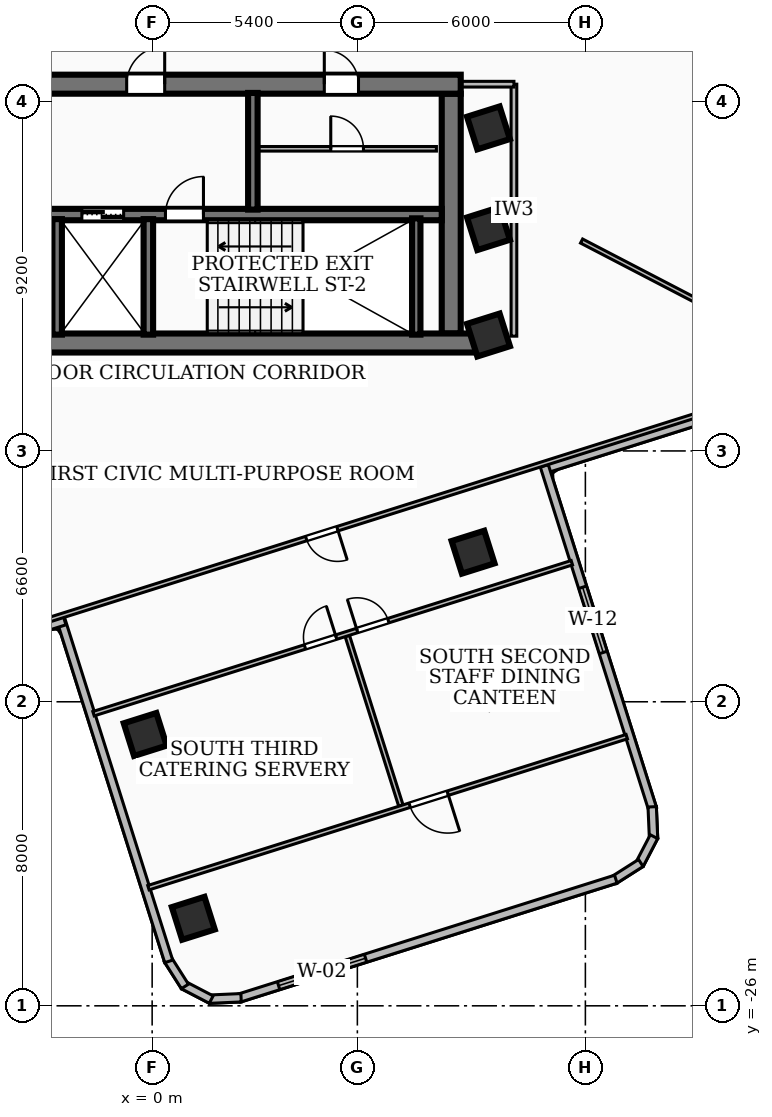
"""IFC4 building model, lengths in metres.
Left out: names, types, materials, properties, quantities, classifications, styles, units other than length and angle.
Written with IfcOpenShell. Run it as: python <this file> out.ifc"""

import sys

from ifc_helpers import new_model, si_unit, direction, frame, frame_2d, origin, origin_2d, place, context, subcontext, project, spatial, rectangle, extrude, element, fill, save


model = new_model("IFC4")
c1 = context("Model", 3, precision=1e-05, world=origin(), true_north=direction((0.0, 1.0)))
c2 = subcontext(c1, "Body", "Model", "MODEL_VIEW")
j1 = project(units=[si_unit("LENGTHUNIT", "METRE"), si_unit("PLANEANGLEUNIT", "RADIAN")], contexts=[c1])
p1 = place(None, origin())
s1 = spatial("IfcSite", under=j1, at=p1, CompositionType="ELEMENT")
p2 = place(p1, origin())
s2 = spatial("IfcBuilding", under=s1, at=p2, CompositionType="ELEMENT")
p3 = place(p2, frame((0.0, 0.0, 152.28)))
s3 = spatial("IfcBuildingStorey", under=s2, at=p3, CompositionType="ELEMENT", Elevation=152.28)
p4 = place(p3, frame((8.78, -8.56, 0.0), z_axis=(0.0, 0.0, 1.0), x_axis=(-1.0, 0.0, 0.0)))
e1 = element("IfcWall", 1, at=p4, inside=s3, PredefinedType="SHEAR", context=c2, shape_type="SweptSolid", body=[
    extrude(rectangle(XDim=17.56, YDim=0.5, at=frame_2d((8.78, 0.0))), origin(), (0.0, 0.0, 1.0), 3.34),
])
p5 = place(p3, frame((-8.12, -1.75, 0.0), z_axis=(0.0, 0.0, 1.0), x_axis=(1.0, 0.0, 0.0)))
e2 = element("IfcWall", 2, at=p5, inside=s3, PredefinedType="SHEAR", context=c2, shape_type="SweptSolid", body=[
    extrude(rectangle(XDim=16.24, YDim=0.5, at=frame_2d((8.12, 0.0))), origin(), (0.0, 0.0, 1.0), 3.34),
])
p6 = place(p5, frame((7.45, 0.0, 0.0)))
e3 = element("IfcOpeningElement", 3, at=p6, cuts=e2, PredefinedType="OPENING", context=c2, shape_type="SweptSolid", body=[
    extrude(rectangle(XDim=1.0, YDim=2.1, at=frame_2d((0.5, 1.05))), frame((0.0, 0.26, 0.0), z_axis=(0.0, -1.0, 0.0), x_axis=(1.0, 0.0, 0.0)), (0.0, 0.0, 1.0), 0.52),
])
p7 = place(p5, frame((12.65, 0.0, 0.0)))
e4 = element("IfcOpeningElement", 4, at=p7, cuts=e2, PredefinedType="OPENING", context=c2, shape_type="SweptSolid", body=[
    extrude(rectangle(XDim=0.9, YDim=2.06, at=frame_2d((0.45, 1.03))), frame((0.0, 0.26, 0.0), z_axis=(0.0, -1.0, 0.0), x_axis=(1.0, 0.0, 0.0)), (0.0, 0.0, 1.0), 0.52),
])
p8 = place(p5, frame((0.565, 0.0, 0.0)))
e5 = element("IfcOpeningElement", 5, at=p8, cuts=e2, PredefinedType="OPENING", context=c2, shape_type="SweptSolid", body=[
    extrude(rectangle(XDim=1.05, YDim=2.15, at=frame_2d((0.525, 1.075))), frame((0.0, 0.26, 0.0), z_axis=(0.0, -1.0, 0.0), x_axis=(1.0, 0.0, 0.0)), (0.0, 0.0, 1.0), 0.52),
])
p9 = place(p5, frame((2.125, 0.0, 0.0)))
e6 = element("IfcOpeningElement", 6, at=p9, cuts=e2, PredefinedType="OPENING", context=c2, shape_type="SweptSolid", body=[
    extrude(rectangle(XDim=1.05, YDim=2.15, at=frame_2d((0.525, 1.075))), frame((0.0, 0.26, 0.0), z_axis=(0.0, -1.0, 0.0), x_axis=(1.0, 0.0, 0.0)), (0.0, 0.0, 1.0), 0.52),
])
p10 = place(p5, frame((3.685, 0.0, 0.0)))
e7 = element("IfcOpeningElement", 7, at=p10, cuts=e2, PredefinedType="OPENING", context=c2, shape_type="SweptSolid", body=[
    extrude(rectangle(XDim=1.05, YDim=2.15, at=frame_2d((0.525, 1.075))), frame((0.0, 0.26, 0.0), z_axis=(0.0, -1.0, 0.0), x_axis=(1.0, 0.0, 0.0)), (0.0, 0.0, 1.0), 0.52),
])
p11 = place(p3, frame((7.87, -2.0, 0.0), z_axis=(0.0, 0.0, 1.0), x_axis=(0.0, -1.0, 0.0)))
e8 = element("IfcWall", 8, at=p11, inside=s3, PredefinedType="SHEAR", context=c2, shape_type="SweptSolid", body=[
    extrude(rectangle(XDim=6.31, YDim=0.5, at=frame_2d((3.155, 0.0))), origin(), (0.0, 0.0, 1.0), 3.34),
])
p12 = place(p3, frame((-7.62, -5.18, 0.0), z_axis=(0.0, 0.0, 1.0), x_axis=(1.0, 0.0, 0.0)))
e9 = element("IfcWall", 9, at=p12, inside=s3, PredefinedType="SOLIDWALL", context=c2, shape_type="SweptSolid", body=[
    extrude(rectangle(XDim=15.24, YDim=0.3, at=frame_2d((7.62, 0.0))), origin(), (0.0, 0.0, 1.0), 3.34),
])
p13 = place(p12, frame((5.77, 0.0, 0.0)))
e10 = element("IfcOpeningElement", 10, at=p13, cuts=e9, PredefinedType="OPENING", context=c2, shape_type="SweptSolid", body=[
    extrude(rectangle(XDim=1.1, YDim=2.15, at=frame_2d((0.55, 1.075))), frame((0.0, 0.16, 0.0), z_axis=(0.0, -1.0, 0.0), x_axis=(1.0, 0.0, 0.0)), (0.0, 0.0, 1.0), 0.32),
])
p14 = place(p12, frame((7.97, 0.0, 0.0)))
e11 = element("IfcOpeningElement", 11, at=p14, cuts=e9, PredefinedType="OPENING", context=c2, shape_type="SweptSolid", body=[
    extrude(rectangle(XDim=1.0, YDim=2.1, at=frame_2d((0.5, 1.05))), frame((0.0, 0.16, 0.0), z_axis=(0.0, -1.0, 0.0), x_axis=(1.0, 0.0, 0.0)), (0.0, 0.0, 1.0), 0.32),
])
p15 = place(p3, frame((6.95, -8.34, 0.0), z_axis=(0.0, 0.0, 1.0), x_axis=(0.0, 1.0, 0.0)))
e12 = element("IfcWall", 12, at=p15, inside=s3, PredefinedType="SOLIDWALL", context=c2, shape_type="SweptSolid", body=[
    extrude(rectangle(XDim=3.06, YDim=0.22, at=frame_2d((1.53, 0.0))), origin(), (0.0, 0.0, 1.0), 3.34),
])
for number, where, z_axis, x_axis in (
    (13, (-0.1, -8.34, 0.0), (0.0, 0.0, 1.0), (0.0, 1.0, 0.0)),
    (14, (-2.5, -8.34, 0.0), (0.0, 0.0, 1.0), (0.0, 1.0, 0.0)),
):
    element("IfcWall", number, at=place(p3, frame(where, z_axis=z_axis, x_axis=x_axis)), inside=s3, PredefinedType="SOLIDWALL", context=c2, shape_type="SweptSolid", body=[
        extrude(rectangle(XDim=3.04, YDim=0.25, at=frame_2d((1.52, 0.0))), origin(), (0.0, 0.0, 1.0), 3.34),
    ])
p16 = place(p3, frame((2.65, -5.05, 0.0), z_axis=(0.0, 0.0, 1.0), x_axis=(0.0, 1.0, 0.0)))
e15 = element("IfcWall", 15, at=p16, inside=s3, PredefinedType="SOLIDWALL", context=c2, shape_type="SweptSolid", body=[
    extrude(rectangle(XDim=3.07, YDim=0.25, at=frame_2d((1.535, 0.0))), origin(), (0.0, 0.0, 1.0), 3.34),
])
for number, where, z_axis, x_axis in (
    (16, (8.85, -5.55, 0.0), (0.0, 0.0, 1.0), (0.954, 0.301, 0.0)),
    (17, (8.85, -2.9, 0.0), (0.0, 0.0, 1.0), (0.954, 0.301, 0.0)),
    (18, (8.85, -8.35, 0.0), (0.0, 0.0, 1.0), (0.954, 0.301, 0.0)),
    (19, (-0.183, -18.86, 0.0), (0.0, 0.0, 1.0), (0.954, 0.301, 0.0)),
    (20, (8.445, -14.064, 0.0), (0.0, 0.0, 1.0), (0.954, 0.301, 0.0)),
    (21, (1.083, -23.697, 0.0), (0.0, 0.0, 1.0), (0.954, 0.301, 0.0)),
    (22, (9.208, -17.615, 0.0), (0.0, 0.0, 1.0), (0.954, 0.301, 0.0)),
):
    element("IfcColumn", number, at=place(p3, frame(where, z_axis=z_axis, x_axis=x_axis)), inside=s3, PredefinedType="COLUMN", context=c2, shape_type="SweptSolid", body=[
        extrude(rectangle(XDim=0.9, YDim=0.9, at=origin_2d()), origin(), (0.0, 0.0, 1.0), 3.6),
    ])
p17 = place(p3, frame((16.706, -9.868, 0.0), z_axis=(0.0, 0.0, 1.0), x_axis=(-0.953629605256, -0.300982683852, 0.0)))
e23 = element("IfcWall", 23, at=p17, inside=s3, PredefinedType="SOLIDWALL", context=c2, shape_type="SweptSolid", body=[
    extrude(rectangle(XDim=6.759, YDim=0.22, at=frame_2d((3.379, 0.0))), origin(), (0.0, 0.0, 1.0), 3.34),
])
p18 = place(p3, frame((10.319, -11.792, 0.0), z_axis=(0.0, 0.0, 1.0), x_axis=(0.301051082334, -0.953608014766, 0.0)))
e24 = element("IfcWall", 24, at=p18, inside=s3, PredefinedType="SOLIDWALL", context=c2, shape_type="SweptSolid", body=[
    extrude(rectangle(XDim=9.46, YDim=0.22, at=frame_2d((4.73, 0.0))), origin(), (0.0, 0.0, 1.0), 3.34),
])
p19 = place(p18, frame((3.35, 0.0, 0.85)))
e25 = element("IfcOpeningElement", 25, at=p19, cuts=e24, PredefinedType="OPENING", context=c2, shape_type="SweptSolid", body=[
    extrude(rectangle(XDim=1.8, YDim=1.6, at=frame_2d((0.9, 0.8))), frame((0.0, 0.12, 0.0), z_axis=(0.0, -1.0, 0.0), x_axis=(1.0, 0.0, 0.0)), (0.0, 0.0, 1.0), 0.24),
])
p20 = place(p3, frame((13.158, -20.764, 0.0), z_axis=(0.0, 0.0, 1.0), x_axis=(0.043335569986, -0.999060572925, 0.0)))
e26 = element("IfcWall", 26, at=p20, inside=s3, PredefinedType="SOLIDWALL", context=c2, shape_type="SweptSolid", body=[
    extrude(rectangle(XDim=0.834, YDim=0.22, at=frame_2d((0.417, 0.0))), origin(), (0.0, 0.0, 1.0), 3.34),
])
p21 = place(p3, frame((13.205, -21.55, 0.0), z_axis=(0.0, 0.0, 1.0), x_axis=(-0.462393015656, -0.886675080891, 0.0)))
e27 = element("IfcWall", 27, at=p21, inside=s3, PredefinedType="SOLIDWALL", context=c2, shape_type="SweptSolid", body=[
    extrude(rectangle(XDim=0.82, YDim=0.22, at=frame_2d((0.41, 0.0))), origin(), (0.0, 0.0, 1.0), 3.34),
])
p22 = place(p3, frame((12.859, -22.242, 0.0), z_axis=(0.0, 0.0, 1.0), x_axis=(-0.843806278008, -0.536647896851, 0.0)))
e28 = element("IfcWall", 28, at=p22, inside=s3, PredefinedType="SOLIDWALL", context=c2, shape_type="SweptSolid", body=[
    extrude(rectangle(XDim=0.833, YDim=0.22, at=frame_2d((0.417, 0.0))), origin(), (0.0, 0.0, 1.0), 3.34),
])
p23 = place(p3, frame((12.201, -22.668, 0.0), z_axis=(0.0, 0.0, 1.0), x_axis=(-0.953590831, -0.30110550814, 0.0)))
e29 = element("IfcWall", 29, at=p23, inside=s3, PredefinedType="SOLIDWALL", context=c2, shape_type="SweptSolid", body=[
    extrude(rectangle(XDim=10.392, YDim=0.22, at=frame_2d((5.196, 0.0))), origin(), (0.0, 0.0, 1.0), 3.34),
])
p24 = place(p23, frame((6.906, 0.0, 0.85)))
e30 = element("IfcOpeningElement", 30, at=p24, cuts=e29, PredefinedType="OPENING", context=c2, shape_type="SweptSolid", body=[
    extrude(rectangle(XDim=2.4, YDim=2.1, at=frame_2d((1.2, 1.05))), frame((0.0, 0.12, 0.0), z_axis=(0.0, -1.0, 0.0), x_axis=(1.0, 0.0, 0.0)), (0.0, 0.0, 1.0), 0.24),
])
p25 = place(p3, frame((2.34, -25.788, 0.0), z_axis=(0.0, 0.0, 1.0), x_axis=(-0.999022158458, -0.044212293648, 0.0)))
e31 = element("IfcWall", 31, at=p25, inside=s3, PredefinedType="SOLIDWALL", context=c2, shape_type="SweptSolid", body=[
    extrude(rectangle(XDim=0.834, YDim=0.22, at=frame_2d((0.417, 0.0))), origin(), (0.0, 0.0, 1.0), 3.34),
])
p26 = place(p3, frame((1.554, -25.836, 0.0), z_axis=(0.0, 0.0, 1.0), x_axis=(-0.886797138652, 0.462158884885, 0.0)))
e32 = element("IfcWall", 32, at=p26, inside=s3, PredefinedType="SOLIDWALL", context=c2, shape_type="SweptSolid", body=[
    extrude(rectangle(XDim=0.82, YDim=0.22, at=frame_2d((0.41, 0.0))), origin(), (0.0, 0.0, 1.0), 3.34),
])
p27 = place(p3, frame((0.862, -25.49, 0.0), z_axis=(0.0, 0.0, 1.0), x_axis=(-0.535984955812, 0.844227532803, 0.0)))
e33 = element("IfcWall", 33, at=p27, inside=s3, PredefinedType="SOLIDWALL", context=c2, shape_type="SweptSolid", body=[
    extrude(rectangle(XDim=0.834, YDim=0.22, at=frame_2d((0.417, 0.0))), origin(), (0.0, 0.0, 1.0), 3.34),
])
p28 = place(p3, frame((0.436, -24.831, 0.0), z_axis=(0.0, 0.0, 1.0), x_axis=(-0.301016470916, 0.953618940792, 0.0)))
e34 = element("IfcWall", 34, at=p28, inside=s3, PredefinedType="SOLIDWALL", context=c2, shape_type="SweptSolid", body=[
    extrude(rectangle(XDim=9.458, YDim=0.22, at=frame_2d((4.729, 0.0))), origin(), (0.0, 0.0, 1.0), 2.152),
])
p29 = place(p3, frame((-2.301, -15.87, 0.0), z_axis=(0.0, 0.0, 1.0), x_axis=(-0.953652264112, -0.300910882413, 0.0)))
e35 = element("IfcWall", 35, at=p29, inside=s3, PredefinedType="SOLIDWALL", context=c2, shape_type="SweptSolid", body=[
    extrude(rectangle(XDim=5.989, YDim=0.22, at=frame_2d((2.994, 0.0))), origin(), (0.0, 0.0, 1.0), 2.152),
])
p30 = place(p3, frame((2.8, -3.45, 0.0), z_axis=(0.0, 0.0, 1.0), x_axis=(1.0, 0.0, 0.0)))
e36 = element("IfcWall", 36, at=p30, inside=s3, PredefinedType="PARTITIONING", context=c2, shape_type="SweptSolid", body=[
    extrude(rectangle(XDim=4.68, YDim=0.12, at=frame_2d((2.34, 0.0))), origin(), (0.0, 0.0, 1.0), 3.34),
])
p31 = place(p30, frame((1.9, 0.0, 0.0)))
e37 = element("IfcOpeningElement", 37, at=p31, cuts=e36, PredefinedType="OPENING", context=c2, shape_type="SweptSolid", body=[
    extrude(rectangle(XDim=0.86, YDim=2.04, at=frame_2d((0.43, 1.02))), frame((0.0, 0.07, 0.0), z_axis=(0.0, -1.0, 0.0), x_axis=(1.0, 0.0, 0.0)), (0.0, 0.0, 1.0), 0.14),
])
p32 = place(p3, frame((9.52, -8.38, 0.0), z_axis=(0.0, 0.0, 1.0), x_axis=(0.0, 1.0, 0.0)))
e38 = element("IfcWall", 38, at=p32, inside=s3, PredefinedType="PARTITIONING", context=c2, shape_type="SweptSolid", body=[
    extrude(rectangle(XDim=6.63, YDim=0.15, at=frame_2d((3.315, 0.0))), origin(), (0.0, 0.0, 1.0), 2.152),
])
p33 = place(p3, frame((7.85, -1.75, 0.0), z_axis=(0.0, 0.0, 1.0), x_axis=(1.0, 0.0, 0.0)))
e39 = element("IfcWall", 39, at=p33, inside=s3, PredefinedType="PARTITIONING", context=c2, shape_type="SweptSolid", body=[
    extrude(rectangle(XDim=1.67, YDim=0.15, at=frame_2d((0.835, 0.0))), origin(), (0.0, 0.0, 1.0), 2.57),
])
p34 = place(p3, frame((11.3, -5.877, 0.0), z_axis=(0.0, 0.0, 1.0), x_axis=(0.887198362964, -0.461388193123, 0.0)))
e40 = element("IfcWall", 40, at=p34, inside=s3, PredefinedType="PARTITIONING", context=c2, shape_type="SweptSolid", body=[
    extrude(rectangle(XDim=6.938, YDim=0.12, at=frame_2d((3.469, 0.0))), origin(), (0.0, 0.0, 1.0), 3.34),
])
p35 = place(p3, frame((10.379, 14.591, 0.0), z_axis=(0.0, 0.0, 1.0), x_axis=(0.301070726534, -0.95360181293, 0.0)))
e41 = element("IfcWall", 41, at=p35, inside=s3, PredefinedType="PARTITIONING", context=c2, shape_type="SweptSolid", body=[
    extrude(rectangle(XDim=20.81, YDim=0.12, at=frame_2d((10.405, 0.0))), origin(), (0.0, 0.0, 1.0), 2.152),
])
p36 = place(p35, frame((10.189, 0.0, 0.0)))
e42 = element("IfcOpeningElement", 42, at=p36, cuts=e41, PredefinedType="OPENING", context=c2, shape_type="SweptSolid", body=[
    extrude(rectangle(XDim=0.86, YDim=2.0, at=frame_2d((0.43, 1.0))), frame((0.0, 0.07, 0.0), z_axis=(0.0, -1.0, 0.0), x_axis=(1.0, 0.0, 0.0)), (0.0, 0.0, 1.0), 0.14),
])
p37 = place(p3, frame((14.591, -10.379, 0.0), z_axis=(0.0, 0.0, 1.0), x_axis=(-0.95360181293, -0.301070726534, 0.0)))
e43 = element("IfcWall", 43, at=p37, inside=s3, PredefinedType="PARTITIONING", context=c2, shape_type="SweptSolid", body=[
    extrude(rectangle(XDim=20.81, YDim=0.12, at=frame_2d((10.405, 0.0))), origin(), (0.0, 0.0, 1.0), 2.152),
])
p38 = place(p37, frame((10.189, 0.0, 0.0)))
e44 = element("IfcOpeningElement", 44, at=p38, cuts=e43, PredefinedType="OPENING", context=c2, shape_type="SweptSolid", body=[
    extrude(rectangle(XDim=0.86, YDim=2.0, at=frame_2d((0.43, 1.0))), frame((0.0, 0.07, 0.0), z_axis=(0.0, -1.0, 0.0), x_axis=(1.0, 0.0, 0.0)), (0.0, 0.0, 1.0), 0.14),
])
p39 = place(p3, frame((5.136, -16.269, 0.0), z_axis=(0.0, 0.0, 1.0), x_axis=(0.301053971024, -0.953607102811, 0.0)))
e45 = element("IfcWall", 45, at=p39, inside=s3, PredefinedType="PARTITIONING", context=c2, shape_type="SweptSolid", body=[
    extrude(rectangle(XDim=4.68, YDim=0.12, at=frame_2d((2.34, 0.0))), origin(), (0.0, 0.0, 1.0), 2.152),
])
p40 = place(p3, frame((-1.543, -18.314, 0.0), z_axis=(0.0, 0.0, 1.0), x_axis=(0.953624308899, 0.300999464247, 0.0)))
e46 = element("IfcWall", 46, at=p40, inside=s3, PredefinedType="PARTITIONING", context=c2, shape_type="SweptSolid", body=[
    extrude(rectangle(XDim=13.199, YDim=0.12, at=frame_2d((6.6, 0.0))), origin(), (0.0, 0.0, 1.0), 2.152),
])
p41 = place(p40, frame((5.835, 0.0, 0.0)))
e47 = element("IfcOpeningElement", 47, at=p41, cuts=e46, PredefinedType="OPENING", context=c2, shape_type="SweptSolid", body=[
    extrude(rectangle(XDim=0.86, YDim=2.04, at=frame_2d((0.43, 1.02))), frame((0.0, 0.07, 0.0), z_axis=(0.0, -1.0, 0.0), x_axis=(1.0, 0.0, 0.0)), (0.0, 0.0, 1.0), 0.14),
])
p42 = place(p40, frame((7.275, 0.0, 0.0)))
e48 = element("IfcOpeningElement", 48, at=p42, cuts=e46, PredefinedType="OPENING", context=c2, shape_type="SweptSolid", body=[
    extrude(rectangle(XDim=0.86, YDim=2.04, at=frame_2d((0.43, 1.02))), frame((0.0, 0.07, 0.0), z_axis=(0.0, -1.0, 0.0), x_axis=(1.0, 0.0, 0.0)), (0.0, 0.0, 1.0), 0.14),
])
p43 = place(p3, frame((12.489, -18.918, 0.0), z_axis=(0.0, 0.0, 1.0), x_axis=(-0.953597759193, -0.301083565912, 0.0)))
e49 = element("IfcWall", 49, at=p43, inside=s3, PredefinedType="PARTITIONING", context=c2, shape_type="SweptSolid", body=[
    extrude(rectangle(XDim=13.199, YDim=0.12, at=frame_2d((6.6, 0.0))), origin(), (0.0, 0.0, 1.0), 2.152),
])
p44 = place(p43, frame((4.94, 0.0, 0.0)))
e50 = element("IfcOpeningElement", 50, at=p44, cuts=e49, PredefinedType="OPENING", context=c2, shape_type="SweptSolid", body=[
    extrude(rectangle(XDim=1.05, YDim=2.08, at=frame_2d((0.525, 1.04))), frame((0.0, 0.07, 0.0), z_axis=(0.0, -1.0, 0.0), x_axis=(1.0, 0.0, 0.0)), (0.0, 0.0, 1.0), 0.14),
])
p45 = place(p19, origin())
e51 = element("IfcWindow", 51, at=p45, inside=s3, PartitioningType="SINGLE_PANEL", PredefinedType="WINDOW", context=c2, shape_type="SweptSolid", body=[
    extrude(rectangle(XDim=1.8, YDim=1.6, at=frame_2d((0.9, 0.8))), frame((0.0, 0.03, 0.0), z_axis=(0.0, -1.0, 0.0), x_axis=(1.0, 0.0, 0.0)), (0.0, 0.0, 1.0), 0.06),
])
fill(e25, e51)
p46 = place(p24, origin())
e52 = element("IfcWindow", 52, at=p46, inside=s3, PartitioningType="SINGLE_PANEL", PredefinedType="WINDOW", context=c2, shape_type="SweptSolid", body=[
    extrude(rectangle(XDim=2.4, YDim=2.1, at=frame_2d((1.2, 1.05))), frame((0.0, 0.03, 0.0), z_axis=(0.0, -1.0, 0.0), x_axis=(1.0, 0.0, 0.0)), (0.0, 0.0, 1.0), 0.06),
])
fill(e30, e52)
p47 = place(p6, origin())
e53 = element("IfcDoor", 53, at=p47, inside=s3, OperationType="SINGLE_SWING_RIGHT", PredefinedType="DOOR", context=c2, shape_type="SweptSolid", body=[
    extrude(rectangle(XDim=1.0, YDim=2.1, at=frame_2d((0.5, 1.05))), frame((0.0, 0.025, 0.0), z_axis=(0.0, -1.0, 0.0), x_axis=(1.0, 0.0, 0.0)), (0.0, 0.0, 1.0), 0.05),
])
fill(e3, e53)
p48 = place(p13, origin())
e54 = element("IfcDoor", 54, at=p48, inside=s3, OperationType="DOUBLE_DOOR_SLIDING", PredefinedType="DOOR", context=c2, shape_type="SweptSolid", body=[
    extrude(rectangle(XDim=1.1, YDim=2.15, at=frame_2d((0.55, 1.075))), frame((0.0, 0.025, 0.0), z_axis=(0.0, -1.0, 0.0), x_axis=(1.0, 0.0, 0.0)), (0.0, 0.0, 1.0), 0.05),
])
fill(e10, e54)
p49 = place(p14, origin())
e55 = element("IfcDoor", 55, at=p49, inside=s3, OperationType="SINGLE_SWING_RIGHT", PredefinedType="DOOR", context=c2, shape_type="SweptSolid", body=[
    extrude(rectangle(XDim=1.0, YDim=2.1, at=frame_2d((0.5, 1.05))), frame((0.0, 0.025, 0.0), z_axis=(0.0, -1.0, 0.0), x_axis=(1.0, 0.0, 0.0)), (0.0, 0.0, 1.0), 0.05),
])
fill(e11, e55)
p50 = place(p7, origin())
e56 = element("IfcDoor", 56, at=p50, inside=s3, OperationType="SINGLE_SWING_LEFT", PredefinedType="DOOR", context=c2, shape_type="SweptSolid", body=[
    extrude(rectangle(XDim=0.9, YDim=2.06, at=frame_2d((0.45, 1.03))), frame((0.0, 0.025, 0.0), z_axis=(0.0, -1.0, 0.0), x_axis=(1.0, 0.0, 0.0)), (0.0, 0.0, 1.0), 0.05),
])
fill(e4, e56)
p51 = place(p31, origin())
e57 = element("IfcDoor", 57, at=p51, inside=s3, OperationType="SINGLE_SWING_LEFT", PredefinedType="DOOR", context=c2, shape_type="SweptSolid", body=[
    extrude(rectangle(XDim=0.86, YDim=2.04, at=frame_2d((0.43, 1.02))), frame((0.0, 0.025, 0.0), z_axis=(0.0, -1.0, 0.0), x_axis=(1.0, 0.0, 0.0)), (0.0, 0.0, 1.0), 0.05),
])
fill(e37, e57)
p52 = place(p38, origin())
e58 = element("IfcDoor", 58, at=p52, inside=s3, OperationType="SINGLE_SWING_LEFT", PredefinedType="DOOR", context=c2, shape_type="SweptSolid", body=[
    extrude(rectangle(XDim=0.86, YDim=2.0, at=frame_2d((0.43, 1.0))), frame((0.0, 0.025, 0.0), z_axis=(0.0, -1.0, 0.0), x_axis=(1.0, 0.0, 0.0)), (0.0, 0.0, 1.0), 0.05),
])
fill(e44, e58)
p53 = place(p41, origin())
e59 = element("IfcDoor", 59, at=p53, inside=s3, OperationType="SINGLE_SWING_RIGHT", PredefinedType="DOOR", context=c2, shape_type="SweptSolid", body=[
    extrude(rectangle(XDim=0.86, YDim=2.04, at=frame_2d((0.43, 1.02))), frame((0.0, 0.025, 0.0), z_axis=(0.0, -1.0, 0.0), x_axis=(1.0, 0.0, 0.0)), (0.0, 0.0, 1.0), 0.05),
])
fill(e47, e59)
p54 = place(p42, origin())
e60 = element("IfcDoor", 60, at=p54, inside=s3, OperationType="SINGLE_SWING_LEFT", PredefinedType="DOOR", context=c2, shape_type="SweptSolid", body=[
    extrude(rectangle(XDim=0.86, YDim=2.04, at=frame_2d((0.43, 1.02))), frame((0.0, 0.025, 0.0), z_axis=(0.0, -1.0, 0.0), x_axis=(1.0, 0.0, 0.0)), (0.0, 0.0, 1.0), 0.05),
])
fill(e48, e60)
p55 = place(p44, origin())
e61 = element("IfcDoor", 61, at=p55, inside=s3, OperationType="SINGLE_SWING_LEFT", PredefinedType="DOOR", context=c2, shape_type="SweptSolid", body=[
    extrude(rectangle(XDim=1.05, YDim=2.08, at=frame_2d((0.525, 1.04))), frame((0.0, 0.025, 0.0), z_axis=(0.0, -1.0, 0.0), x_axis=(1.0, 0.0, 0.0)), (0.0, 0.0, 1.0), 0.05),
])
fill(e50, e61)
save(model, sys.argv[1])
